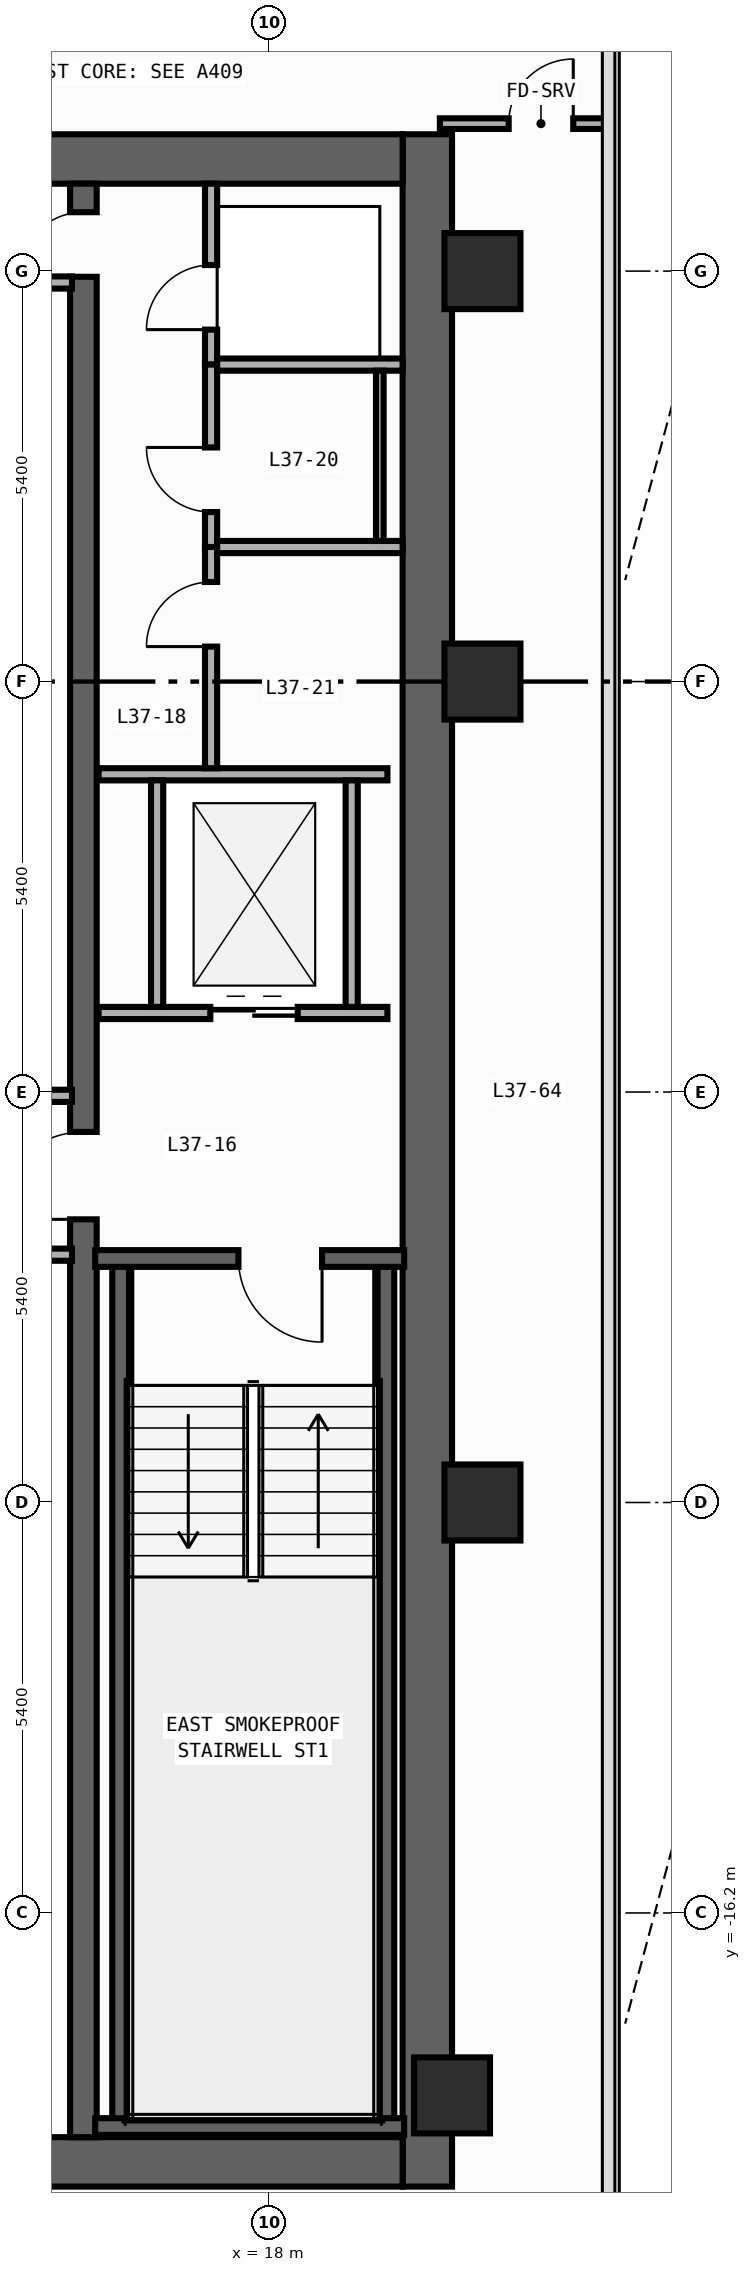
"""IFC4 building model, lengths in metres.
Left out: names, types, materials, properties, quantities, classifications, styles, units other than length and angle.
Written with IfcOpenShell. Run it as: python <this file> out.ifc"""

import sys

from ifc_helpers import new_model, si_unit, direction, frame, frame_2d, origin, origin_2d, place, context, subcontext, project, spatial, rectangle, extrude, element, fill, save


model = new_model("IFC4")
c1 = context("Model", 3, precision=1e-05, world=origin(), true_north=direction((0.0, 1.0)))
c2 = subcontext(c1, "Body", "Model", "MODEL_VIEW")
j1 = project(units=[si_unit("LENGTHUNIT", "METRE"), si_unit("PLANEANGLEUNIT", "RADIAN")], contexts=[c1])
p1 = place(None, origin())
s1 = spatial("IfcSite", under=j1, at=p1, CompositionType="ELEMENT")
p2 = place(p1, origin())
s2 = spatial("IfcBuilding", under=s1, at=p2, CompositionType="ELEMENT")
p3 = place(p2, frame((0.0, 0.0, 165.0)))
s3 = spatial("IfcBuildingStorey", under=s2, at=p3, CompositionType="ELEMENT", Elevation=165.0)
p4 = place(p3, frame((20.075, -19.8, 0.0), z_axis=(0.0, 0.0, 1.0), x_axis=(0.0, 1.0, 0.0)))
e1 = element("IfcWall", 1, at=p4, inside=s3, PredefinedType="SHEAR", context=c2, shape_type="SweptSolid", body=[
    extrude(rectangle(XDim=27.0, YDim=0.65, at=frame_2d((13.5, 0.0))), origin(), (0.0, 0.0, 1.0), 3.54),
])
for number, where, z_axis, x_axis in (
    (2, (12.65, -19.475, 0.0), (0.0, 0.0, 1.0), (1.0, 0.0, 0.0)),
    (3, (12.65, 6.875, 0.0), (0.0, 0.0, 1.0), (1.0, 0.0, 0.0)),
):
    element("IfcWall", number, at=place(p3, frame(where, z_axis=z_axis, x_axis=x_axis)), inside=s3, PredefinedType="SHEAR", context=c2, shape_type="SweptSolid", body=[
        extrude(rectangle(XDim=7.1, YDim=0.65, at=frame_2d((3.55, 0.0))), origin(), (0.0, 0.0, 1.0), 3.54),
    ])
p5 = place(p3, frame((15.55, -19.15, 0.0), z_axis=(0.0, 0.0, 1.0), x_axis=(0.0, 1.0, 0.0)))
e4 = element("IfcWall", 4, at=p5, inside=s3, PredefinedType="SHEAR", context=c2, shape_type="SweptSolid", body=[
    extrude(rectangle(XDim=25.7, YDim=0.35, at=frame_2d((12.85, 0.0))), origin(), (0.0, 0.0, 1.0), 3.54),
])
p6 = place(p5, frame((12.075, 0.0, 0.0)))
e5 = element("IfcOpeningElement", 5, at=p6, cuts=e4, PredefinedType="OPENING", context=c2, shape_type="SweptSolid", body=[
    extrude(rectangle(XDim=1.15, YDim=2.2, at=frame_2d((0.575, 1.1))), frame((0.0, 0.185, 0.0), z_axis=(0.0, -1.0, 0.0), x_axis=(1.0, 0.0, 0.0)), (0.0, 0.0, 1.0), 0.37),
])
p7 = place(p5, frame((24.475, 0.0, 0.0)))
e6 = element("IfcOpeningElement", 6, at=p7, cuts=e4, PredefinedType="OPENING", context=c2, shape_type="SweptSolid", body=[
    extrude(rectangle(XDim=0.85, YDim=2.1, at=frame_2d((0.425, 1.05))), frame((0.0, 0.185, 0.0), z_axis=(0.0, -1.0, 0.0), x_axis=(1.0, 0.0, 0.0)), (0.0, 0.0, 1.0), 0.37),
])
for number, where, z_axis, x_axis in (
    (7, (16.04, -19.01, 0.0), (0.0, 0.0, 1.0), (0.0, 1.0, 0.0)),
    (8, (19.53, -19.01, 0.0), (0.0, 0.0, 1.0), (0.0, 1.0, 0.0)),
):
    element("IfcWall", number, at=place(p3, frame(where, z_axis=z_axis, x_axis=x_axis)), inside=s3, PredefinedType="SHEAR", context=c2, shape_type="SweptSolid", body=[
        extrude(rectangle(XDim=11.42, YDim=0.22, at=frame_2d((5.71, 0.0))), origin(), (0.0, 0.0, 1.0), 3.54),
    ])
p8 = place(p3, frame((15.705, -19.01, 0.0), z_axis=(0.0, 0.0, 1.0), x_axis=(1.0, 0.0, 0.0)))
e9 = element("IfcWall", 9, at=p8, inside=s3, PredefinedType="SHEAR", context=c2, shape_type="SweptSolid", body=[
    extrude(rectangle(XDim=4.065, YDim=0.22, at=frame_2d((2.032, 0.0))), origin(), (0.0, 0.0, 1.0), 3.54),
])
p9 = place(p3, frame((19.77, -7.59, 0.0), z_axis=(0.0, 0.0, 1.0), x_axis=(-1.0, 0.0, 0.0)))
e10 = element("IfcWall", 10, at=p9, inside=s3, PredefinedType="SHEAR", context=c2, shape_type="SweptSolid", body=[
    extrude(rectangle(XDim=4.065, YDim=0.22, at=frame_2d((2.032, 0.0))), origin(), (0.0, 0.0, 1.0), 3.54),
])
p10 = place(p9, frame((1.08, 0.0, 0.0)))
e11 = element("IfcOpeningElement", 11, at=p10, cuts=e10, PredefinedType="OPENING", context=c2, shape_type="SweptSolid", body=[
    extrude(rectangle(XDim=1.1, YDim=2.2, at=frame_2d((0.55, 1.1))), frame((0.0, 0.12, 0.0), z_axis=(0.0, -1.0, 0.0), x_axis=(1.0, 0.0, 0.0)), (0.0, 0.0, 1.0), 0.24),
])
for number, where, z_axis, x_axis in (
    (12, (20.4, -18.6, 0.0), (0.0, 0.0, 1.0), (1.0, 0.0, 0.0)),
    (13, (20.8, -10.8, 0.0), (0.0, 0.0, 1.0), (1.0, 0.0, 0.0)),
    (14, (20.8, 0.0, 0.0), (0.0, 0.0, 1.0), (1.0, 0.0, 0.0)),
    (15, (20.8, 5.4, 0.0), (0.0, 0.0, 1.0), (1.0, 0.0, 0.0)),
):
    element("IfcColumn", number, at=place(p3, frame(where, z_axis=z_axis, x_axis=x_axis)), inside=s3, PredefinedType="COLUMN", context=c2, shape_type="SweptSolid", body=[
        extrude(rectangle(XDim=1.0, YDim=1.0, at=origin_2d()), origin(), (0.0, 0.0, 1.0), 3.8),
    ])
p11 = place(p3, frame((15.75, -4.36, 0.0), z_axis=(0.0, 0.0, 1.0), x_axis=(1.0, 0.0, 0.0)))
e16 = element("IfcWall", 16, at=p11, inside=s3, PredefinedType="STANDARD", context=c2, shape_type="SweptSolid", body=[
    extrude(rectangle(XDim=3.8, YDim=0.16, at=frame_2d((1.9, 0.0))), origin(), (0.0, 0.0, 1.0), 3.54),
])
p12 = place(p11, frame((1.47, 0.0, 0.0)))
e17 = element("IfcOpeningElement", 17, at=p12, cuts=e16, PredefinedType="OPENING", context=c2, shape_type="SweptSolid", body=[
    extrude(rectangle(XDim=1.15, YDim=2.2, at=frame_2d((0.575, 1.1))), frame((0.0, 0.09, 0.0), z_axis=(0.0, -1.0, 0.0), x_axis=(1.0, 0.0, 0.0)), (0.0, 0.0, 1.0), 0.18),
])
p13 = place(p3, frame((15.75, -1.22, 0.0), z_axis=(0.0, 0.0, 1.0), x_axis=(1.0, 0.0, 0.0)))
e18 = element("IfcWall", 18, at=p13, inside=s3, PredefinedType="STANDARD", context=c2, shape_type="SweptSolid", body=[
    extrude(rectangle(XDim=3.8, YDim=0.16, at=frame_2d((1.9, 0.0))), origin(), (0.0, 0.0, 1.0), 3.54),
])
for number, where, z_axis, x_axis in (
    (19, (16.52, -4.28, 0.0), (0.0, 0.0, 1.0), (0.0, 1.0, 0.0)),
    (20, (19.08, -4.28, 0.0), (0.0, 0.0, 1.0), (0.0, 1.0, 0.0)),
):
    element("IfcWall", number, at=place(p3, frame(where, z_axis=z_axis, x_axis=x_axis)), inside=s3, PredefinedType="STANDARD", context=c2, shape_type="SweptSolid", body=[
        extrude(rectangle(XDim=2.98, YDim=0.16, at=frame_2d((1.49, 0.0))), origin(), (0.0, 0.0, 1.0), 3.54),
    ])
for number, where, z_axis, x_axis in (
    (21, (12.8, -5.45, 0.0), (0.0, 0.0, 1.0), (1.0, 0.0, 0.0)),
    (22, (12.8, -7.54, 0.0), (0.0, 0.0, 1.0), (1.0, 0.0, 0.0)),
    (23, (12.8, 5.25, 0.0), (0.0, 0.0, 1.0), (1.0, 0.0, 0.0)),
):
    element("IfcWall", number, at=place(p3, frame(where, z_axis=z_axis, x_axis=x_axis)), inside=s3, PredefinedType="STANDARD", context=c2, shape_type="SweptSolid", body=[
        extrude(rectangle(XDim=2.6, YDim=0.16, at=frame_2d((1.3, 0.0))), origin(), (0.0, 0.0, 1.0), 3.54),
    ])
p14 = place(p3, frame((17.23, 4.17, 0.0), z_axis=(0.0, 0.0, 1.0), x_axis=(0.0, 1.0, 0.0)))
e24 = element("IfcWall", 24, at=p14, inside=s3, PredefinedType="PARTITIONING", context=c2, shape_type="SweptSolid", body=[
    extrude(rectangle(XDim=2.38, YDim=0.16, at=frame_2d((1.19, 0.0))), origin(), (0.0, 0.0, 1.0), 3.54),
])
p15 = place(p14, frame((0.46, 0.0, 0.0)))
e25 = element("IfcOpeningElement", 25, at=p15, cuts=e24, PredefinedType="OPENING", context=c2, shape_type="SweptSolid", body=[
    extrude(rectangle(XDim=0.85, YDim=2.1, at=frame_2d((0.425, 1.05))), frame((0.0, 0.09, 0.0), z_axis=(0.0, -1.0, 0.0), x_axis=(1.0, 0.0, 0.0)), (0.0, 0.0, 1.0), 0.18),
])
p16 = place(p3, frame((17.23, 1.77, 0.0), z_axis=(0.0, 0.0, 1.0), x_axis=(0.0, 1.0, 0.0)))
e26 = element("IfcWall", 26, at=p16, inside=s3, PredefinedType="PARTITIONING", context=c2, shape_type="SweptSolid", body=[
    extrude(rectangle(XDim=2.4, YDim=0.16, at=frame_2d((1.2, 0.0))), origin(), (0.0, 0.0, 1.0), 3.54),
])
p17 = place(p16, frame((0.46, 0.0, 0.0)))
e27 = element("IfcOpeningElement", 27, at=p17, cuts=e26, PredefinedType="OPENING", context=c2, shape_type="SweptSolid", body=[
    extrude(rectangle(XDim=0.85, YDim=2.1, at=frame_2d((0.425, 1.05))), frame((0.0, 0.09, 0.0), z_axis=(0.0, -1.0, 0.0), x_axis=(1.0, 0.0, 0.0)), (0.0, 0.0, 1.0), 0.18),
])
p18 = place(p3, frame((17.23, -1.14, 0.0), z_axis=(0.0, 0.0, 1.0), x_axis=(0.0, 1.0, 0.0)))
e28 = element("IfcWall", 28, at=p18, inside=s3, PredefinedType="PARTITIONING", context=c2, shape_type="SweptSolid", body=[
    extrude(rectangle(XDim=2.91, YDim=0.16, at=frame_2d((1.455, 0.0))), origin(), (0.0, 0.0, 1.0), 3.54),
])
p19 = place(p18, frame((1.6, 0.0, 0.0)))
e29 = element("IfcOpeningElement", 29, at=p19, cuts=e28, PredefinedType="OPENING", context=c2, shape_type="SweptSolid", body=[
    extrude(rectangle(XDim=0.85, YDim=2.1, at=frame_2d((0.425, 1.05))), frame((0.0, 0.09, 0.0), z_axis=(0.0, -1.0, 0.0), x_axis=(1.0, 0.0, 0.0)), (0.0, 0.0, 1.0), 0.18),
])
for number, where, z_axis, x_axis in (
    (30, (17.31, 4.17, 0.0), (0.0, 0.0, 1.0), (1.0, 0.0, 0.0)),
    (31, (17.31, 1.77, 0.0), (0.0, 0.0, 1.0), (1.0, 0.0, 0.0)),
):
    element("IfcWall", number, at=place(p3, frame(where, z_axis=z_axis, x_axis=x_axis)), inside=s3, PredefinedType="PARTITIONING", context=c2, shape_type="SweptSolid", body=[
        extrude(rectangle(XDim=2.44, YDim=0.16, at=frame_2d((1.22, 0.0))), origin(), (0.0, 0.0, 1.0), 3.54),
    ])
p20 = place(p3, frame((20.24, 7.34, 0.0), z_axis=(0.0, 0.0, 1.0), x_axis=(1.0, 0.0, 0.0)))
e32 = element("IfcWall", 32, at=p20, inside=s3, PredefinedType="PARTITIONING", context=c2, shape_type="SweptSolid", body=[
    extrude(rectangle(XDim=2.215, YDim=0.14, at=frame_2d((1.107, 0.0))), origin(), (0.0, 0.0, 1.0), 3.54),
])
p21 = place(p20, frame((0.905, 0.0, 0.0)))
e33 = element("IfcOpeningElement", 33, at=p21, cuts=e32, PredefinedType="OPENING", context=c2, shape_type="SweptSolid", body=[
    extrude(rectangle(XDim=0.85, YDim=2.1, at=frame_2d((0.425, 1.05))), frame((0.0, 0.08, 0.0), z_axis=(0.0, -1.0, 0.0), x_axis=(1.0, 0.0, 0.0)), (0.0, 0.0, 1.0), 0.16),
])
p22 = place(p3, frame((19.45, 4.09, 0.0), z_axis=(0.0, 0.0, 1.0), x_axis=(0.0, -1.0, 0.0)))
e34 = element("IfcWall", 34, at=p22, inside=s3, PredefinedType="PARTITIONING", context=c2, shape_type="SweptSolid", body=[
    extrude(rectangle(XDim=2.24, YDim=0.1, at=frame_2d((1.12, 0.0))), origin(), (0.0, 0.0, 1.0), 3.54),
])
p23 = place(p10, origin())
e35 = element("IfcDoor", 35, at=p23, inside=s3, OperationType="SINGLE_SWING_LEFT", PredefinedType="DOOR", context=c2, shape_type="SweptSolid", body=[
    extrude(rectangle(XDim=1.1, YDim=2.2, at=frame_2d((0.55, 1.1))), frame((0.0, 0.025, 0.0), z_axis=(0.0, -1.0, 0.0), x_axis=(1.0, 0.0, 0.0)), (0.0, 0.0, 1.0), 0.05),
])
fill(e11, e35)
p24 = place(p6, origin())
e36 = element("IfcDoor", 36, at=p24, inside=s3, OperationType="SINGLE_SWING_LEFT", PredefinedType="DOOR", context=c2, shape_type="SweptSolid", body=[
    extrude(rectangle(XDim=1.15, YDim=2.2, at=frame_2d((0.575, 1.1))), frame((0.0, 0.025, 0.0), z_axis=(0.0, -1.0, 0.0), x_axis=(1.0, 0.0, 0.0)), (0.0, 0.0, 1.0), 0.05),
])
fill(e5, e36)
p25 = place(p7, origin())
e37 = element("IfcDoor", 37, at=p25, inside=s3, OperationType="SINGLE_SWING_LEFT", PredefinedType="DOOR", context=c2, shape_type="SweptSolid", body=[
    extrude(rectangle(XDim=0.85, YDim=2.1, at=frame_2d((0.425, 1.05))), frame((0.0, 0.025, 0.0), z_axis=(0.0, -1.0, 0.0), x_axis=(1.0, 0.0, 0.0)), (0.0, 0.0, 1.0), 0.05),
])
fill(e6, e37)
p26 = place(p12, origin())
e38 = element("IfcDoor", 38, at=p26, inside=s3, OperationType="DOUBLE_DOOR_SLIDING", PredefinedType="DOOR", context=c2, shape_type="SweptSolid", body=[
    extrude(rectangle(XDim=1.15, YDim=2.2, at=frame_2d((0.575, 1.1))), frame((0.0, 0.025, 0.0), z_axis=(0.0, -1.0, 0.0), x_axis=(1.0, 0.0, 0.0)), (0.0, 0.0, 1.0), 0.05),
])
fill(e17, e38)
p27 = place(p15, origin())
e39 = element("IfcDoor", 39, at=p27, inside=s3, OperationType="SINGLE_SWING_LEFT", PredefinedType="DOOR", context=c2, shape_type="SweptSolid", body=[
    extrude(rectangle(XDim=0.85, YDim=2.1, at=frame_2d((0.425, 1.05))), frame((0.0, 0.025, 0.0), z_axis=(0.0, -1.0, 0.0), x_axis=(1.0, 0.0, 0.0)), (0.0, 0.0, 1.0), 0.05),
])
fill(e25, e39)
p28 = place(p17, origin())
e40 = element("IfcDoor", 40, at=p28, inside=s3, OperationType="SINGLE_SWING_RIGHT", PredefinedType="DOOR", context=c2, shape_type="SweptSolid", body=[
    extrude(rectangle(XDim=0.85, YDim=2.1, at=frame_2d((0.425, 1.05))), frame((0.0, 0.025, 0.0), z_axis=(0.0, -1.0, 0.0), x_axis=(1.0, 0.0, 0.0)), (0.0, 0.0, 1.0), 0.05),
])
fill(e27, e40)
p29 = place(p19, origin())
e41 = element("IfcDoor", 41, at=p29, inside=s3, OperationType="SINGLE_SWING_LEFT", PredefinedType="DOOR", context=c2, shape_type="SweptSolid", body=[
    extrude(rectangle(XDim=0.85, YDim=2.1, at=frame_2d((0.425, 1.05))), frame((0.0, 0.025, 0.0), z_axis=(0.0, -1.0, 0.0), x_axis=(1.0, 0.0, 0.0)), (0.0, 0.0, 1.0), 0.05),
])
fill(e29, e41)
p30 = place(p21, origin())
e42 = element("IfcDoor", 42, at=p30, inside=s3, OperationType="SINGLE_SWING_RIGHT", PredefinedType="DOOR", context=c2, shape_type="SweptSolid", body=[
    extrude(rectangle(XDim=0.85, YDim=2.1, at=frame_2d((0.425, 1.05))), frame((0.0, 0.025, 0.0), z_axis=(0.0, -1.0, 0.0), x_axis=(1.0, 0.0, 0.0)), (0.0, 0.0, 1.0), 0.05),
])
fill(e33, e42)
save(model, sys.argv[1])
